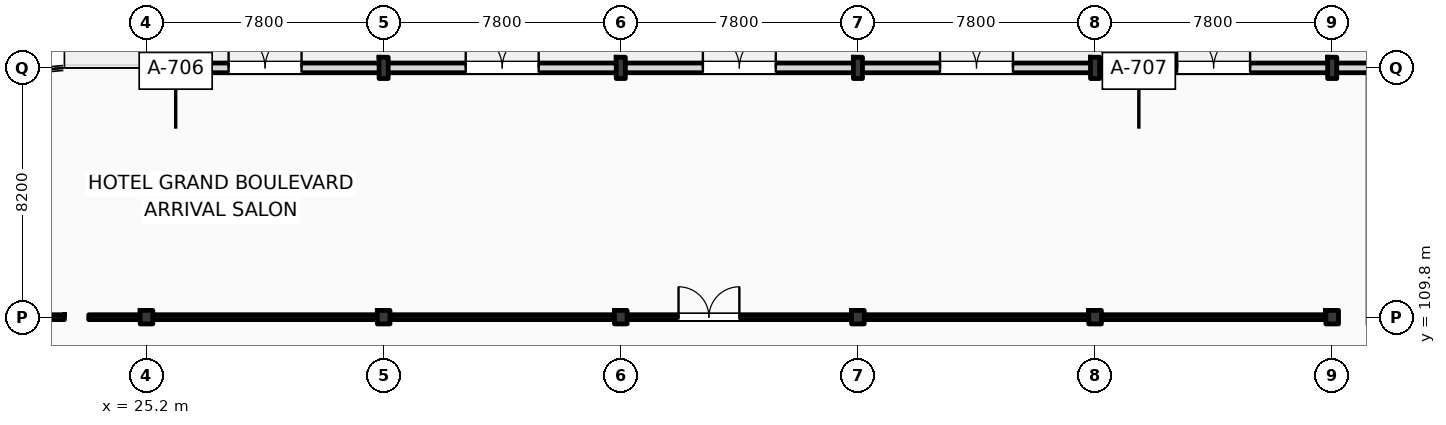
"""IFC4 building model, lengths in metres.
Left out: names, types, materials, properties, quantities, classifications, styles, units other than length and angle.
Written with IfcOpenShell. Run it as: python <this file> out.ifc"""

import sys

from ifc_helpers import new_model, si_unit, direction, frame, frame_2d, origin, origin_2d, place, context, subcontext, project, spatial, rectangle, i_section, extrude, element, fill, save


model = new_model("IFC4")
c1 = context("Model", 3, precision=1e-05, world=origin(), true_north=direction((0.0, 1.0)))
c2 = subcontext(c1, "Body", "Model", "MODEL_VIEW")
j1 = project(units=[si_unit("LENGTHUNIT", "METRE"), si_unit("PLANEANGLEUNIT", "RADIAN")], contexts=[c1])
p1 = place(None, origin())
s1 = spatial("IfcSite", under=j1, at=p1, CompositionType="ELEMENT")
p2 = place(p1, origin())
s2 = spatial("IfcBuilding", under=s1, at=p2, CompositionType="ELEMENT")
p3 = place(p2, origin())
s3 = spatial("IfcBuildingStorey", under=s2, at=p3, CompositionType="ELEMENT", Elevation=0.0)
p4 = place(p3, frame((25.2, 109.8, 0.0), z_axis=(0.0, 0.0, 1.0), x_axis=(1.0, 0.0, 0.0)))
e1 = element("IfcColumn", 1, at=p4, inside=s3, PredefinedType="COLUMN", context=c2, shape_type="SweptSolid", body=[
    extrude(i_section(OverallWidth=0.416, OverallDepth=0.446, WebThickness=0.036, FlangeThickness=0.048, FilletRadius=0.015, at=origin_2d()), origin(), (0.0, 0.0, 1.0), 6.0),
])
p5 = place(p3, frame((25.2, 118.0, 0.0), z_axis=(0.0, 0.0, 1.0), x_axis=(1.0, 0.0, 0.0)))
e2 = element("IfcColumn", 2, at=p5, inside=s3, PredefinedType="COLUMN", context=c2, shape_type="SweptSolid", body=[
    extrude(i_section(OverallWidth=0.3, OverallDepth=0.7, WebThickness=0.017, FlangeThickness=0.032, FilletRadius=0.027, at=origin_2d()), origin(), (0.0, 0.0, 1.0), 6.0),
])
p6 = place(p3, frame((33.0, 109.8, 0.0), z_axis=(0.0, 0.0, 1.0), x_axis=(1.0, 0.0, 0.0)))
e3 = element("IfcColumn", 3, at=p6, inside=s3, PredefinedType="COLUMN", context=c2, shape_type="SweptSolid", body=[
    extrude(i_section(OverallWidth=0.416, OverallDepth=0.446, WebThickness=0.036, FlangeThickness=0.048, FilletRadius=0.015, at=origin_2d()), origin(), (0.0, 0.0, 1.0), 6.0),
])
p7 = place(p3, frame((33.0, 118.0, 0.0), z_axis=(0.0, 0.0, 1.0), x_axis=(1.0, 0.0, 0.0)))
e4 = element("IfcColumn", 4, at=p7, inside=s3, PredefinedType="COLUMN", context=c2, shape_type="SweptSolid", body=[
    extrude(i_section(OverallWidth=0.3, OverallDepth=0.7, WebThickness=0.017, FlangeThickness=0.032, FilletRadius=0.027, at=origin_2d()), origin(), (0.0, 0.0, 1.0), 6.0),
])
p8 = place(p3, frame((40.8, 109.8, 0.0), z_axis=(0.0, 0.0, 1.0), x_axis=(1.0, 0.0, 0.0)))
e5 = element("IfcColumn", 5, at=p8, inside=s3, PredefinedType="COLUMN", context=c2, shape_type="SweptSolid", body=[
    extrude(i_section(OverallWidth=0.416, OverallDepth=0.446, WebThickness=0.036, FlangeThickness=0.048, FilletRadius=0.015, at=origin_2d()), origin(), (0.0, 0.0, 1.0), 6.0),
])
p9 = place(p3, frame((40.8, 118.0, 0.0), z_axis=(0.0, 0.0, 1.0), x_axis=(1.0, 0.0, 0.0)))
e6 = element("IfcColumn", 6, at=p9, inside=s3, PredefinedType="COLUMN", context=c2, shape_type="SweptSolid", body=[
    extrude(i_section(OverallWidth=0.3, OverallDepth=0.7, WebThickness=0.017, FlangeThickness=0.032, FilletRadius=0.027, at=origin_2d()), origin(), (0.0, 0.0, 1.0), 6.0),
])
p10 = place(p3, frame((48.6, 109.8, 0.0), z_axis=(0.0, 0.0, 1.0), x_axis=(1.0, 0.0, 0.0)))
e7 = element("IfcColumn", 7, at=p10, inside=s3, PredefinedType="COLUMN", context=c2, shape_type="SweptSolid", body=[
    extrude(i_section(OverallWidth=0.416, OverallDepth=0.446, WebThickness=0.036, FlangeThickness=0.048, FilletRadius=0.015, at=origin_2d()), origin(), (0.0, 0.0, 1.0), 6.0),
])
p11 = place(p3, frame((48.6, 118.0, 0.0), z_axis=(0.0, 0.0, 1.0), x_axis=(1.0, 0.0, 0.0)))
e8 = element("IfcColumn", 8, at=p11, inside=s3, PredefinedType="COLUMN", context=c2, shape_type="SweptSolid", body=[
    extrude(i_section(OverallWidth=0.3, OverallDepth=0.7, WebThickness=0.017, FlangeThickness=0.032, FilletRadius=0.027, at=origin_2d()), origin(), (0.0, 0.0, 1.0), 6.0),
])
p12 = place(p3, frame((56.4, 109.8, 0.0), z_axis=(0.0, 0.0, 1.0), x_axis=(1.0, 0.0, 0.0)))
e9 = element("IfcColumn", 9, at=p12, inside=s3, PredefinedType="COLUMN", context=c2, shape_type="SweptSolid", body=[
    extrude(i_section(OverallWidth=0.416, OverallDepth=0.446, WebThickness=0.036, FlangeThickness=0.048, FilletRadius=0.015, at=origin_2d()), origin(), (0.0, 0.0, 1.0), 6.0),
])
p13 = place(p3, frame((56.4, 118.0, 0.0), z_axis=(0.0, 0.0, 1.0), x_axis=(1.0, 0.0, 0.0)))
e10 = element("IfcColumn", 10, at=p13, inside=s3, PredefinedType="COLUMN", context=c2, shape_type="SweptSolid", body=[
    extrude(i_section(OverallWidth=0.3, OverallDepth=0.7, WebThickness=0.017, FlangeThickness=0.032, FilletRadius=0.027, at=origin_2d()), origin(), (0.0, 0.0, 1.0), 6.0),
])
p14 = place(p3, frame((64.2, 109.8, 0.0), z_axis=(0.0, 0.0, 1.0), x_axis=(1.0, 0.0, 0.0)))
e11 = element("IfcColumn", 11, at=p14, inside=s3, PredefinedType="COLUMN", context=c2, shape_type="SweptSolid", body=[
    extrude(i_section(OverallWidth=0.416, OverallDepth=0.446, WebThickness=0.036, FlangeThickness=0.048, FilletRadius=0.015, at=origin_2d()), origin(), (0.0, 0.0, 1.0), 6.0),
])
p15 = place(p3, frame((64.2, 118.0, 0.0), z_axis=(0.0, 0.0, 1.0), x_axis=(1.0, 0.0, 0.0)))
e12 = element("IfcColumn", 12, at=p15, inside=s3, PredefinedType="COLUMN", context=c2, shape_type="SweptSolid", body=[
    extrude(i_section(OverallWidth=0.3, OverallDepth=0.7, WebThickness=0.017, FlangeThickness=0.032, FilletRadius=0.027, at=origin_2d()), origin(), (0.0, 0.0, 1.0), 6.0),
])
p16 = place(p3, frame((25.2, 118.0, 0.0), z_axis=(0.0, 0.0, 1.0), x_axis=(1.0, 0.0, 0.0)))
e13 = element("IfcWall", 13, at=p16, inside=s3, PredefinedType="STANDARD", context=c2, shape_type="SweptSolid", body=[
    extrude(rectangle(XDim=7.8, YDim=0.32, at=frame_2d((3.9, 0.0))), origin(), (0.0, 0.0, 1.0), 5.19),
])
p17 = place(p16, frame((2.7, 0.0, 0.0)))
e14 = element("IfcOpeningElement", 14, at=p17, cuts=e13, PredefinedType="OPENING", context=c2, shape_type="SweptSolid", body=[
    extrude(rectangle(XDim=2.4, YDim=2.6, at=frame_2d((1.2, 1.3))), frame((0.0, 0.17, 0.0), z_axis=(0.0, -1.0, 0.0), x_axis=(1.0, 0.0, 0.0)), (0.0, 0.0, 1.0), 0.34),
])
p18 = place(p3, frame((33.0, 118.0, 0.0), z_axis=(0.0, 0.0, 1.0), x_axis=(1.0, 0.0, 0.0)))
e15 = element("IfcWall", 15, at=p18, inside=s3, PredefinedType="STANDARD", context=c2, shape_type="SweptSolid", body=[
    extrude(rectangle(XDim=7.8, YDim=0.32, at=frame_2d((3.9, 0.0))), origin(), (0.0, 0.0, 1.0), 5.19),
])
p19 = place(p18, frame((2.7, 0.0, 0.0)))
e16 = element("IfcOpeningElement", 16, at=p19, cuts=e15, PredefinedType="OPENING", context=c2, shape_type="SweptSolid", body=[
    extrude(rectangle(XDim=2.4, YDim=2.45, at=frame_2d((1.2, 1.225))), frame((0.0, 0.17, 0.0), z_axis=(0.0, -1.0, 0.0), x_axis=(1.0, 0.0, 0.0)), (0.0, 0.0, 1.0), 0.34),
])
p20 = place(p3, frame((40.8, 118.0, 0.0), z_axis=(0.0, 0.0, 1.0), x_axis=(1.0, 0.0, 0.0)))
e17 = element("IfcWall", 17, at=p20, inside=s3, PredefinedType="STANDARD", context=c2, shape_type="SweptSolid", body=[
    extrude(rectangle(XDim=7.8, YDim=0.32, at=frame_2d((3.9, 0.0))), origin(), (0.0, 0.0, 1.0), 5.19),
])
p21 = place(p20, frame((2.7, 0.0, 0.0)))
e18 = element("IfcOpeningElement", 18, at=p21, cuts=e17, PredefinedType="OPENING", context=c2, shape_type="SweptSolid", body=[
    extrude(rectangle(XDim=2.4, YDim=2.6, at=frame_2d((1.2, 1.3))), frame((0.0, 0.17, 0.0), z_axis=(0.0, -1.0, 0.0), x_axis=(1.0, 0.0, 0.0)), (0.0, 0.0, 1.0), 0.34),
])
p22 = place(p3, frame((48.6, 118.0, 0.0), z_axis=(0.0, 0.0, 1.0), x_axis=(1.0, 0.0, 0.0)))
e19 = element("IfcWall", 19, at=p22, inside=s3, PredefinedType="STANDARD", context=c2, shape_type="SweptSolid", body=[
    extrude(rectangle(XDim=7.8, YDim=0.32, at=frame_2d((3.9, 0.0))), origin(), (0.0, 0.0, 1.0), 5.19),
])
p23 = place(p22, frame((2.7, 0.0, 0.0)))
e20 = element("IfcOpeningElement", 20, at=p23, cuts=e19, PredefinedType="OPENING", context=c2, shape_type="SweptSolid", body=[
    extrude(rectangle(XDim=2.4, YDim=2.6, at=frame_2d((1.2, 1.3))), frame((0.0, 0.17, 0.0), z_axis=(0.0, -1.0, 0.0), x_axis=(1.0, 0.0, 0.0)), (0.0, 0.0, 1.0), 0.34),
])
p24 = place(p3, frame((56.4, 118.0, 0.0), z_axis=(0.0, 0.0, 1.0), x_axis=(1.0, 0.0, 0.0)))
e21 = element("IfcWall", 21, at=p24, inside=s3, PredefinedType="STANDARD", context=c2, shape_type="SweptSolid", body=[
    extrude(rectangle(XDim=7.8, YDim=0.32, at=frame_2d((3.9, 0.0))), origin(), (0.0, 0.0, 1.0), 5.19),
])
p25 = place(p24, frame((2.7, 0.0, 0.0)))
e22 = element("IfcOpeningElement", 22, at=p25, cuts=e21, PredefinedType="OPENING", context=c2, shape_type="SweptSolid", body=[
    extrude(rectangle(XDim=2.4, YDim=2.6, at=frame_2d((1.2, 1.3))), frame((0.0, 0.17, 0.0), z_axis=(0.0, -1.0, 0.0), x_axis=(1.0, 0.0, 0.0)), (0.0, 0.0, 1.0), 0.34),
])
p26 = place(p3, frame((64.2, 118.0, 0.0), z_axis=(0.0, 0.0, 1.0), x_axis=(1.0, 0.0, 0.0)))
e23 = element("IfcWall", 23, at=p26, inside=s3, PredefinedType="STANDARD", context=c2, shape_type="SweptSolid", body=[
    extrude(rectangle(XDim=7.8, YDim=0.32, at=frame_2d((3.9, 0.0))), origin(), (0.0, 0.0, 1.0), 5.19),
])
p27 = place(p26, frame((2.7, 0.0, 0.0)))
e24 = element("IfcOpeningElement", 24, at=p27, cuts=e23, PredefinedType="OPENING", context=c2, shape_type="SweptSolid", body=[
    extrude(rectangle(XDim=2.4, YDim=2.6, at=frame_2d((1.2, 1.3))), frame((0.0, 0.17, 0.0), z_axis=(0.0, -1.0, 0.0), x_axis=(1.0, 0.0, 0.0)), (0.0, 0.0, 1.0), 0.34),
])
p28 = place(p3, frame((23.3, 109.8, 0.0), z_axis=(0.0, 0.0, 1.0), x_axis=(1.0, 0.0, 0.0)))
e25 = element("IfcWall", 25, at=p28, inside=s3, PredefinedType="PARTITIONING", context=c2, shape_type="SweptSolid", body=[
    extrude(rectangle(XDim=40.8, YDim=0.16, at=frame_2d((20.4, 0.0))), origin(), (0.0, 0.0, 1.0), 5.14),
])
p29 = place(p28, frame((19.4, 0.0, 0.0)))
e26 = element("IfcOpeningElement", 26, at=p29, cuts=e25, PredefinedType="OPENING", context=c2, shape_type="SweptSolid", body=[
    extrude(rectangle(XDim=2.0, YDim=2.5, at=frame_2d((1.0, 1.25))), frame((0.0, 0.09, 0.0), z_axis=(0.0, -1.0, 0.0), x_axis=(1.0, 0.0, 0.0)), (0.0, 0.0, 1.0), 0.18),
])
p30 = place(p3, frame((9.1, 109.8, 0.0), z_axis=(0.0, 0.0, 1.0), x_axis=(1.0, 0.0, 0.0)))
e27 = element("IfcWall", 27, at=p30, inside=s3, PredefinedType="PARTITIONING", context=c2, shape_type="SweptSolid", body=[
    extrude(rectangle(XDim=13.4, YDim=0.16, at=frame_2d((6.7, 0.0))), origin(), (0.0, 0.0, 1.0), 5.14),
])
p31 = place(p30, frame((5.05, 0.0, 0.0)))
e28 = element("IfcOpeningElement", 28, at=p31, cuts=e27, PredefinedType="OPENING", context=c2, shape_type="SweptSolid", body=[
    extrude(rectangle(XDim=1.3, YDim=2.2, at=frame_2d((0.65, 1.1))), frame((0.0, 0.09, 0.0), z_axis=(0.0, -1.0, 0.0), x_axis=(1.0, 0.0, 0.0)), (0.0, 0.0, 1.0), 0.18),
])
p32 = place(p17, origin())
e29 = element("IfcDoor", 29, at=p32, inside=s3, OperationType="DOUBLE_SWING_LEFT", PredefinedType="DOOR", context=c2, shape_type="SweptSolid", body=[
    extrude(rectangle(XDim=2.4, YDim=2.6, at=frame_2d((1.2, 1.3))), frame((0.0, 0.025, 0.0), z_axis=(0.0, -1.0, 0.0), x_axis=(1.0, 0.0, 0.0)), (0.0, 0.0, 1.0), 0.05),
])
fill(e14, e29)
p33 = place(p19, origin())
e30 = element("IfcDoor", 30, at=p33, inside=s3, OperationType="DOUBLE_SWING_LEFT", PredefinedType="DOOR", context=c2, shape_type="SweptSolid", body=[
    extrude(rectangle(XDim=2.4, YDim=2.45, at=frame_2d((1.2, 1.225))), frame((0.0, 0.025, 0.0), z_axis=(0.0, -1.0, 0.0), x_axis=(1.0, 0.0, 0.0)), (0.0, 0.0, 1.0), 0.05),
])
fill(e16, e30)
p34 = place(p21, origin())
e31 = element("IfcDoor", 31, at=p34, inside=s3, OperationType="DOUBLE_SWING_LEFT", PredefinedType="DOOR", context=c2, shape_type="SweptSolid", body=[
    extrude(rectangle(XDim=2.4, YDim=2.6, at=frame_2d((1.2, 1.3))), frame((0.0, 0.025, 0.0), z_axis=(0.0, -1.0, 0.0), x_axis=(1.0, 0.0, 0.0)), (0.0, 0.0, 1.0), 0.05),
])
fill(e18, e31)
p35 = place(p23, origin())
e32 = element("IfcDoor", 32, at=p35, inside=s3, OperationType="DOUBLE_SWING_LEFT", PredefinedType="DOOR", context=c2, shape_type="SweptSolid", body=[
    extrude(rectangle(XDim=2.4, YDim=2.6, at=frame_2d((1.2, 1.3))), frame((0.0, 0.025, 0.0), z_axis=(0.0, -1.0, 0.0), x_axis=(1.0, 0.0, 0.0)), (0.0, 0.0, 1.0), 0.05),
])
fill(e20, e32)
p36 = place(p25, origin())
e33 = element("IfcDoor", 33, at=p36, inside=s3, OperationType="DOUBLE_SWING_LEFT", PredefinedType="DOOR", context=c2, shape_type="SweptSolid", body=[
    extrude(rectangle(XDim=2.4, YDim=2.6, at=frame_2d((1.2, 1.3))), frame((0.0, 0.025, 0.0), z_axis=(0.0, -1.0, 0.0), x_axis=(1.0, 0.0, 0.0)), (0.0, 0.0, 1.0), 0.05),
])
fill(e22, e33)
p37 = place(p29, origin())
e34 = element("IfcDoor", 34, at=p37, inside=s3, OperationType="DOUBLE_SWING_RIGHT", PredefinedType="DOOR", context=c2, shape_type="SweptSolid", body=[
    extrude(rectangle(XDim=2.0, YDim=2.5, at=frame_2d((1.0, 1.25))), frame((0.0, 0.025, 0.0), z_axis=(0.0, -1.0, 0.0), x_axis=(1.0, 0.0, 0.0)), (0.0, 0.0, 1.0), 0.05),
])
fill(e26, e34)
save(model, sys.argv[1])
